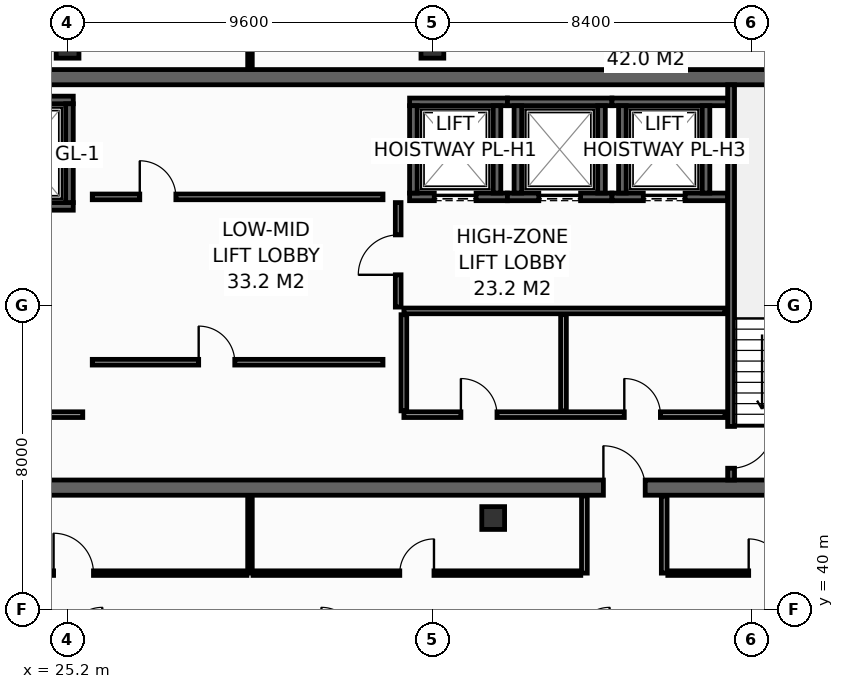
"""IFC4 building model, lengths in metres.
Left out: names, types, materials, properties, quantities, classifications, styles, units other than length and angle.
Written with IfcOpenShell. Run it as: python <this file> out.ifc"""

import sys

from ifc_helpers import new_model, si_unit, direction, frame, frame_2d, origin, origin_2d, place, context, subcontext, project, spatial, rectangle, hollow_rectangle, extrude, element, fill, save


model = new_model("IFC4")
c1 = context("Model", 3, precision=1e-05, world=origin(), true_north=direction((0.0, 1.0)))
c2 = subcontext(c1, "Body", "Model", "MODEL_VIEW")
j1 = project(units=[si_unit("LENGTHUNIT", "METRE"), si_unit("PLANEANGLEUNIT", "RADIAN")], contexts=[c1])
p1 = place(None, origin())
s1 = spatial("IfcSite", under=j1, at=p1, CompositionType="ELEMENT")
p2 = place(p1, origin())
s2 = spatial("IfcBuilding", under=s1, at=p2, CompositionType="ELEMENT")
p3 = place(p2, frame((0.0, 0.0, 280.0)))
s3 = spatial("IfcBuildingStorey", under=s2, at=p3, CompositionType="ELEMENT", Elevation=280.0)
p4 = place(p3, frame((13.7, 43.2, 0.0), z_axis=(0.0, 0.0, 1.0), x_axis=(1.0, 0.0, 0.0)))
e1 = element("IfcWall", 1, at=p4, inside=s3, PredefinedType="SHEAR", context=c2, shape_type="SweptSolid", body=[
    extrude(rectangle(XDim=32.5, YDim=0.4, at=frame_2d((16.25, 0.0))), origin(), (0.0, 0.0, 1.0), 3.55),
])
p5 = place(p4, frame((5.4, 0.0, 0.0)))
e2 = element("IfcOpeningElement", 2, at=p5, cuts=e1, PredefinedType="OPENING", context=c2, shape_type="SweptSolid", body=[
    extrude(rectangle(XDim=1.1, YDim=2.15, at=frame_2d((0.55, 1.075))), frame((0.0, 0.21, 0.0), z_axis=(0.0, -1.0, 0.0), x_axis=(1.0, 0.0, 0.0)), (0.0, 0.0, 1.0), 0.42),
])
p6 = place(p4, frame((25.6, 0.0, 0.0)))
e3 = element("IfcOpeningElement", 3, at=p6, cuts=e1, PredefinedType="OPENING", context=c2, shape_type="SweptSolid", body=[
    extrude(rectangle(XDim=1.1, YDim=2.15, at=frame_2d((0.55, 1.075))), frame((0.0, 0.21, 0.0), z_axis=(0.0, -1.0, 0.0), x_axis=(1.0, 0.0, 0.0)), (0.0, 0.0, 1.0), 0.42),
])
p7 = place(p3, frame((13.7, 54.0, 0.0), z_axis=(0.0, 0.0, 1.0), x_axis=(1.0, 0.0, 0.0)))
e4 = element("IfcWall", 4, at=p7, inside=s3, PredefinedType="SHEAR", context=c2, shape_type="SweptSolid", body=[
    extrude(rectangle(XDim=32.5, YDim=0.4, at=frame_2d((16.25, 0.0))), origin(), (0.0, 0.0, 1.0), 3.55),
])
for number, where, z_axis, x_axis in (
    (5, (25.2, 54.8, 0.0), (0.0, 0.0, 1.0), (1.0, 0.0, 0.0)),
    (6, (34.8, 54.8, 0.0), (0.0, 0.0, 1.0), (1.0, 0.0, 0.0)),
    (7, (36.4, 42.4, 0.0), (0.0, 0.0, 1.0), (1.0, 0.0, 0.0)),
):
    element("IfcColumn", number, at=place(p3, frame(where, z_axis=z_axis, x_axis=x_axis)), inside=s3, PredefinedType="COLUMN", context=c2, shape_type="SweptSolid", body=[
        extrude(hollow_rectangle(XDim=0.6, YDim=0.6, WallThickness=0.028, at=origin_2d()), origin(), (0.0, 0.0, 1.0), 3.8),
    ])
p8 = place(p3, frame((22.5, 50.6, 0.0), z_axis=(0.0, 0.0, 1.0), x_axis=(1.0, 0.0, 0.0)))
e8 = element("IfcWall", 8, at=p8, inside=s3, PredefinedType="SHEAR", context=c2, shape_type="SweptSolid", body=[
    extrude(rectangle(XDim=2.85, YDim=0.2, at=frame_2d((1.425, 0.0))), origin(), (0.0, 0.0, 1.0), 3.55),
])
p9 = place(p8, frame((0.925, 0.0, 0.0)))
e9 = element("IfcOpeningElement", 9, at=p9, cuts=e8, PredefinedType="OPENING", context=c2, shape_type="SweptSolid", body=[
    extrude(rectangle(XDim=1.25, YDim=2.3, at=frame_2d((0.625, 1.15))), frame((0.0, 0.11, 0.0), z_axis=(0.0, -1.0, 0.0), x_axis=(1.0, 0.0, 0.0)), (0.0, 0.0, 1.0), 0.22),
])
p10 = place(p3, frame((22.5, 53.4, 0.0), z_axis=(0.0, 0.0, 1.0), x_axis=(1.0, 0.0, 0.0)))
e10 = element("IfcWall", 10, at=p10, inside=s3, PredefinedType="SHEAR", context=c2, shape_type="SweptSolid", body=[
    extrude(rectangle(XDim=2.85, YDim=0.2, at=frame_2d((1.425, 0.0))), origin(), (0.0, 0.0, 1.0), 3.55),
])
p11 = place(p3, frame((25.25, 50.7, 0.0), z_axis=(0.0, 0.0, 1.0), x_axis=(0.0, 1.0, 0.0)))
e11 = element("IfcWall", 11, at=p11, inside=s3, PredefinedType="SHEAR", context=c2, shape_type="SweptSolid", body=[
    extrude(rectangle(XDim=2.6, YDim=0.2, at=frame_2d((1.3, 0.0))), origin(), (0.0, 0.0, 1.0), 3.55),
])
p12 = place(p3, frame((34.2, 50.85, 0.0), z_axis=(0.0, 0.0, 1.0), x_axis=(1.0, 0.0, 0.0)))
e12 = element("IfcWall", 12, at=p12, inside=s3, PredefinedType="SHEAR", context=c2, shape_type="SweptSolid", body=[
    extrude(rectangle(XDim=2.575, YDim=0.2, at=frame_2d((1.288, 0.0))), origin(), (0.0, 0.0, 1.0), 3.55),
])
p13 = place(p12, frame((0.65, 0.0, 0.0)))
e13 = element("IfcOpeningElement", 13, at=p13, cuts=e12, PredefinedType="OPENING", context=c2, shape_type="SweptSolid", body=[
    extrude(rectangle(XDim=1.1, YDim=2.2, at=frame_2d((0.55, 1.1))), frame((0.0, 0.11, 0.0), z_axis=(0.0, -1.0, 0.0), x_axis=(1.0, 0.0, 0.0)), (0.0, 0.0, 1.0), 0.22),
])
p14 = place(p3, frame((34.2, 53.35, 0.0), z_axis=(0.0, 0.0, 1.0), x_axis=(1.0, 0.0, 0.0)))
e14 = element("IfcWall", 14, at=p14, inside=s3, PredefinedType="SHEAR", context=c2, shape_type="SweptSolid", body=[
    extrude(rectangle(XDim=2.575, YDim=0.2, at=frame_2d((1.288, 0.0))), origin(), (0.0, 0.0, 1.0), 3.55),
])
for number, where, z_axis, x_axis in (
    (15, (34.3, 50.95, 0.0), (0.0, 0.0, 1.0), (0.0, 1.0, 0.0)),
    (16, (36.5, 50.95, 0.0), (0.0, 0.0, 1.0), (0.0, 1.0, 0.0)),
):
    element("IfcWall", number, at=place(p3, frame(where, z_axis=z_axis, x_axis=x_axis)), inside=s3, PredefinedType="SHEAR", context=c2, shape_type="SweptSolid", body=[
        extrude(rectangle(XDim=2.3, YDim=0.2, at=frame_2d((1.15, 0.0))), origin(), (0.0, 0.0, 1.0), 3.55),
    ])
p15 = place(p3, frame((36.775, 50.85, 0.0), z_axis=(0.0, 0.0, 1.0), x_axis=(1.0, 0.0, 0.0)))
e17 = element("IfcWall", 17, at=p15, inside=s3, PredefinedType="SHEAR", context=c2, shape_type="SweptSolid", body=[
    extrude(rectangle(XDim=2.75, YDim=0.2, at=frame_2d((1.375, 0.0))), origin(), (0.0, 0.0, 1.0), 3.55),
])
p16 = place(p15, frame((0.825, 0.0, 0.0)))
e18 = element("IfcOpeningElement", 18, at=p16, cuts=e17, PredefinedType="OPENING", context=c2, shape_type="SweptSolid", body=[
    extrude(rectangle(XDim=1.1, YDim=2.2, at=frame_2d((0.55, 1.1))), frame((0.0, 0.11, 0.0), z_axis=(0.0, -1.0, 0.0), x_axis=(1.0, 0.0, 0.0)), (0.0, 0.0, 1.0), 0.22),
])
p17 = place(p3, frame((36.775, 53.35, 0.0), z_axis=(0.0, 0.0, 1.0), x_axis=(1.0, 0.0, 0.0)))
e19 = element("IfcWall", 19, at=p17, inside=s3, PredefinedType="SHEAR", context=c2, shape_type="SweptSolid", body=[
    extrude(rectangle(XDim=2.75, YDim=0.2, at=frame_2d((1.375, 0.0))), origin(), (0.0, 0.0, 1.0), 3.55),
])
for number, where, z_axis, x_axis in (
    (20, (37.05, 50.95, 0.0), (0.0, 0.0, 1.0), (0.0, 1.0, 0.0)),
    (21, (39.25, 50.95, 0.0), (0.0, 0.0, 1.0), (0.0, 1.0, 0.0)),
):
    element("IfcWall", number, at=place(p3, frame(where, z_axis=z_axis, x_axis=x_axis)), inside=s3, PredefinedType="SHEAR", context=c2, shape_type="SweptSolid", body=[
        extrude(rectangle(XDim=2.3, YDim=0.2, at=frame_2d((1.15, 0.0))), origin(), (0.0, 0.0, 1.0), 3.55),
    ])
p18 = place(p3, frame((39.525, 50.85, 0.0), z_axis=(0.0, 0.0, 1.0), x_axis=(1.0, 0.0, 0.0)))
e22 = element("IfcWall", 22, at=p18, inside=s3, PredefinedType="SHEAR", context=c2, shape_type="SweptSolid", body=[
    extrude(rectangle(XDim=3.045, YDim=0.2, at=frame_2d((1.522, 0.0))), origin(), (0.0, 0.0, 1.0), 3.55),
])
p19 = place(p18, frame((0.825, 0.0, 0.0)))
e23 = element("IfcOpeningElement", 23, at=p19, cuts=e22, PredefinedType="OPENING", context=c2, shape_type="SweptSolid", body=[
    extrude(rectangle(XDim=1.1, YDim=2.2, at=frame_2d((0.55, 1.1))), frame((0.0, 0.11, 0.0), z_axis=(0.0, -1.0, 0.0), x_axis=(1.0, 0.0, 0.0)), (0.0, 0.0, 1.0), 0.22),
])
p20 = place(p3, frame((39.525, 53.35, 0.0), z_axis=(0.0, 0.0, 1.0), x_axis=(1.0, 0.0, 0.0)))
e24 = element("IfcWall", 24, at=p20, inside=s3, PredefinedType="SHEAR", context=c2, shape_type="SweptSolid", body=[
    extrude(rectangle(XDim=3.045, YDim=0.2, at=frame_2d((1.522, 0.0))), origin(), (0.0, 0.0, 1.0), 3.55),
])
for number, where, z_axis, x_axis in (
    (25, (39.8, 50.95, 0.0), (0.0, 0.0, 1.0), (0.0, 1.0, 0.0)),
    (26, (42.0, 50.95, 0.0), (0.0, 0.0, 1.0), (0.0, 1.0, 0.0)),
):
    element("IfcWall", number, at=place(p3, frame(where, z_axis=z_axis, x_axis=x_axis)), inside=s3, PredefinedType="SHEAR", context=c2, shape_type="SweptSolid", body=[
        extrude(rectangle(XDim=2.3, YDim=0.2, at=frame_2d((1.15, 0.0))), origin(), (0.0, 0.0, 1.0), 3.55),
    ])
p21 = place(p3, frame((42.66, 53.8, 0.0), z_axis=(0.0, 0.0, 1.0), x_axis=(0.0, -1.0, 0.0)))
e27 = element("IfcWall", 27, at=p21, inside=s3, PredefinedType="SHEAR", context=c2, shape_type="SweptSolid", body=[
    extrude(rectangle(XDim=10.4, YDim=0.18, at=frame_2d((5.2, 0.0))), origin(), (0.0, 0.0, 1.0), 3.55),
])
p22 = place(p21, frame((8.99, 0.0, 0.0)))
e28 = element("IfcOpeningElement", 28, at=p22, cuts=e27, PredefinedType="OPENING", context=c2, shape_type="SweptSolid", body=[
    extrude(rectangle(XDim=1.1, YDim=2.15, at=frame_2d((0.55, 1.075))), frame((0.0, 0.1, 0.0), z_axis=(0.0, -1.0, 0.0), x_axis=(1.0, 0.0, 0.0)), (0.0, 0.0, 1.0), 0.2),
])
p23 = place(p3, frame((22.68, 45.12, 0.0), z_axis=(0.0, 0.0, 1.0), x_axis=(1.0, 0.0, 0.0)))
e29 = element("IfcWall", 29, at=p23, inside=s3, PredefinedType="PARTITIONING", context=c2, shape_type="SweptSolid", body=[
    extrude(rectangle(XDim=2.92, YDim=0.15, at=frame_2d((1.46, 0.0))), origin(), (0.0, 0.0, 1.0), 3.55),
])
p24 = place(p23, frame((0.85, 0.0, 0.0)))
e30 = element("IfcOpeningElement", 30, at=p24, cuts=e29, PredefinedType="OPENING", context=c2, shape_type="SweptSolid", body=[
    extrude(rectangle(XDim=1.1, YDim=2.15, at=frame_2d((0.55, 1.075))), frame((0.0, 0.085, 0.0), z_axis=(0.0, -1.0, 0.0), x_axis=(1.0, 0.0, 0.0)), (0.0, 0.0, 1.0), 0.17),
])
p25 = place(p3, frame((33.9, 47.95, 0.0), z_axis=(0.0, 0.0, 1.0), x_axis=(0.0, 1.0, 0.0)))
e31 = element("IfcWall", 31, at=p25, inside=s3, PredefinedType="PARTITIONING", context=c2, shape_type="SweptSolid", body=[
    extrude(rectangle(XDim=2.75, YDim=0.15, at=frame_2d((1.375, 0.0))), origin(), (0.0, 0.0, 1.0), 3.55),
])
p26 = place(p25, frame((0.85, 0.0, 0.0)))
e32 = element("IfcOpeningElement", 32, at=p26, cuts=e31, PredefinedType="OPENING", context=c2, shape_type="SweptSolid", body=[
    extrude(rectangle(XDim=1.05, YDim=2.15, at=frame_2d((0.525, 1.075))), frame((0.0, 0.085, 0.0), z_axis=(0.0, -1.0, 0.0), x_axis=(1.0, 0.0, 0.0)), (0.0, 0.0, 1.0), 0.17),
])
p27 = place(p3, frame((34.05, 45.12, 0.0), z_axis=(0.0, 0.0, 1.0), x_axis=(1.0, 0.0, 0.0)))
e33 = element("IfcWall", 33, at=p27, inside=s3, PredefinedType="PARTITIONING", context=c2, shape_type="SweptSolid", body=[
    extrude(rectangle(XDim=8.45, YDim=0.15, at=frame_2d((4.225, 0.0))), origin(), (0.0, 0.0, 1.0), 3.55),
])
p28 = place(p27, frame((1.5, 0.0, 0.0)))
e34 = element("IfcOpeningElement", 34, at=p28, cuts=e33, PredefinedType="OPENING", context=c2, shape_type="SweptSolid", body=[
    extrude(rectangle(XDim=0.95, YDim=2.15, at=frame_2d((0.475, 1.075))), frame((0.0, 0.085, 0.0), z_axis=(0.0, -1.0, 0.0), x_axis=(1.0, 0.0, 0.0)), (0.0, 0.0, 1.0), 0.17),
])
p29 = place(p27, frame((5.8, 0.0, 0.0)))
e35 = element("IfcOpeningElement", 35, at=p29, cuts=e33, PredefinedType="OPENING", context=c2, shape_type="SweptSolid", body=[
    extrude(rectangle(XDim=0.95, YDim=2.15, at=frame_2d((0.475, 1.075))), frame((0.0, 0.085, 0.0), z_axis=(0.0, -1.0, 0.0), x_axis=(1.0, 0.0, 0.0)), (0.0, 0.0, 1.0), 0.17),
])
p30 = place(p3, frame((34.05, 47.85, 0.0), z_axis=(0.0, 0.0, 1.0), x_axis=(1.0, 0.0, 0.0)))
e36 = element("IfcWall", 36, at=p30, inside=s3, PredefinedType="PARTITIONING", context=c2, shape_type="SweptSolid", body=[
    extrude(rectangle(XDim=8.45, YDim=0.15, at=frame_2d((4.225, 0.0))), origin(), (0.0, 0.0, 1.0), 3.55),
])
for number, where, z_axis, x_axis in (
    (37, (38.25, 45.22, 0.0), (0.0, 0.0, 1.0), (0.0, 1.0, 0.0)),
    (38, (34.05, 45.22, 0.0), (0.0, 0.0, 1.0), (0.0, 1.0, 0.0)),
):
    element("IfcWall", number, at=place(p3, frame(where, z_axis=z_axis, x_axis=x_axis)), inside=s3, PredefinedType="PARTITIONING", context=c2, shape_type="SweptSolid", body=[
        extrude(rectangle(XDim=2.53, YDim=0.15, at=frame_2d((1.265, 0.0))), origin(), (0.0, 0.0, 1.0), 3.55),
    ])
p31 = place(p3, frame((25.85, 50.85, 0.0), z_axis=(0.0, 0.0, 1.0), x_axis=(1.0, 0.0, 0.0)))
e39 = element("IfcWall", 39, at=p31, inside=s3, PredefinedType="PARTITIONING", context=c2, shape_type="SweptSolid", body=[
    extrude(rectangle(XDim=7.65, YDim=0.15, at=frame_2d((3.825, 0.0))), origin(), (0.0, 0.0, 1.0), 3.55),
])
p32 = place(p31, frame((1.25, 0.0, 0.0)))
e40 = element("IfcOpeningElement", 40, at=p32, cuts=e39, PredefinedType="OPENING", context=c2, shape_type="SweptSolid", body=[
    extrude(rectangle(XDim=0.95, YDim=2.15, at=frame_2d((0.475, 1.075))), frame((0.0, 0.085, 0.0), z_axis=(0.0, -1.0, 0.0), x_axis=(1.0, 0.0, 0.0)), (0.0, 0.0, 1.0), 0.17),
])
p33 = place(p3, frame((25.85, 46.5, 0.0), z_axis=(0.0, 0.0, 1.0), x_axis=(1.0, 0.0, 0.0)))
e41 = element("IfcWall", 41, at=p33, inside=s3, PredefinedType="PARTITIONING", context=c2, shape_type="SweptSolid", body=[
    extrude(rectangle(XDim=7.65, YDim=0.15, at=frame_2d((3.825, 0.0))), origin(), (0.0, 0.0, 1.0), 3.55),
])
p34 = place(p33, frame((2.8, 0.0, 0.0)))
e42 = element("IfcOpeningElement", 42, at=p34, cuts=e41, PredefinedType="OPENING", context=c2, shape_type="SweptSolid", body=[
    extrude(rectangle(XDim=0.95, YDim=2.15, at=frame_2d((0.475, 1.075))), frame((0.0, 0.085, 0.0), z_axis=(0.0, -1.0, 0.0), x_axis=(1.0, 0.0, 0.0)), (0.0, 0.0, 1.0), 0.17),
])
p35 = place(p3, frame((30.0, 54.22, 0.0), z_axis=(0.0, 0.0, 1.0), x_axis=(0.0, 1.0, 0.0)))
e43 = element("IfcWall", 43, at=p35, inside=s3, PredefinedType="PARTITIONING", context=c2, shape_type="SweptSolid", body=[
    extrude(rectangle(XDim=1.775, YDim=0.12, at=frame_2d((0.888, 0.0))), origin(), (0.0, 0.0, 1.0), 2.935),
])
for number, where, z_axis, x_axis in (
    (44, (38.8, 40.95, 0.0), (0.0, 0.0, 1.0), (0.0, 1.0, 0.0)),
    (45, (40.9, 40.95, 0.0), (0.0, 0.0, 1.0), (0.0, 1.0, 0.0)),
):
    element("IfcWall", number, at=place(p3, frame(where, z_axis=z_axis, x_axis=x_axis)), inside=s3, PredefinedType="PARTITIONING", context=c2, shape_type="SweptSolid", body=[
        extrude(rectangle(XDim=2.03, YDim=0.15, at=frame_2d((1.015, 0.0))), origin(), (0.0, 0.0, 1.0), 3.55),
    ])
p36 = place(p3, frame((30.0, 40.95, 0.0), z_axis=(0.0, 0.0, 1.0), x_axis=(0.0, 1.0, 0.0)))
e46 = element("IfcWall", 46, at=p36, inside=s3, PredefinedType="PARTITIONING", context=c2, shape_type="SweptSolid", body=[
    extrude(rectangle(XDim=2.03, YDim=0.12, at=frame_2d((1.015, 0.0))), origin(), (0.0, 0.0, 1.0), 2.947),
])
p37 = place(p3, frame((20.795, 40.95, 0.0), z_axis=(0.0, 0.0, 1.0), x_axis=(1.0, 0.0, 0.0)))
e47 = element("IfcWall", 47, at=p37, inside=s3, PredefinedType="PARTITIONING", context=c2, shape_type="SweptSolid", body=[
    extrude(rectangle(XDim=9.125, YDim=0.12, at=frame_2d((4.562, 0.0))), origin(), (0.0, 0.0, 1.0), 3.047),
])
p38 = place(p37, frame((4.037, 0.0, 0.0)))
e48 = element("IfcOpeningElement", 48, at=p38, cuts=e47, PredefinedType="OPENING", context=c2, shape_type="SweptSolid", body=[
    extrude(rectangle(XDim=1.05, YDim=2.15, at=frame_2d((0.525, 1.075))), frame((0.0, 0.07, 0.0), z_axis=(0.0, -1.0, 0.0), x_axis=(1.0, 0.0, 0.0)), (0.0, 0.0, 1.0), 0.14),
])
p39 = place(p3, frame((30.08, 40.95, 0.0), z_axis=(0.0, 0.0, 1.0), x_axis=(1.0, 0.0, 0.0)))
e49 = element("IfcWall", 49, at=p39, inside=s3, PredefinedType="PARTITIONING", context=c2, shape_type="SweptSolid", body=[
    extrude(rectangle(XDim=8.625, YDim=0.12, at=frame_2d((4.312, 0.0))), origin(), (0.0, 0.0, 1.0), 3.047),
])
p40 = place(p39, frame((3.862, 0.0, 0.0)))
e50 = element("IfcOpeningElement", 50, at=p40, cuts=e49, PredefinedType="OPENING", context=c2, shape_type="SweptSolid", body=[
    extrude(rectangle(XDim=0.9, YDim=2.1, at=frame_2d((0.45, 1.05))), frame((0.0, 0.07, 0.0), z_axis=(0.0, -1.0, 0.0), x_axis=(1.0, 0.0, 0.0)), (0.0, 0.0, 1.0), 0.14),
])
p41 = place(p3, frame((40.995, 40.95, 0.0), z_axis=(0.0, 0.0, 1.0), x_axis=(1.0, 0.0, 0.0)))
e51 = element("IfcWall", 51, at=p41, inside=s3, PredefinedType="PARTITIONING", context=c2, shape_type="SweptSolid", body=[
    extrude(rectangle(XDim=5.155, YDim=0.12, at=frame_2d((2.577, 0.0))), origin(), (0.0, 0.0, 1.0), 3.55),
])
p42 = place(p41, frame((2.128, 0.0, 0.0)))
e52 = element("IfcOpeningElement", 52, at=p42, cuts=e51, PredefinedType="OPENING", context=c2, shape_type="SweptSolid", body=[
    extrude(rectangle(XDim=0.9, YDim=2.1, at=frame_2d((0.45, 1.05))), frame((0.0, 0.07, 0.0), z_axis=(0.0, -1.0, 0.0), x_axis=(1.0, 0.0, 0.0)), (0.0, 0.0, 1.0), 0.14),
])
p43 = place(p13, origin())
e53 = element("IfcDoor", 53, at=p43, inside=s3, OperationType="SLIDING_TO_LEFT", PredefinedType="DOOR", context=c2, shape_type="SweptSolid", body=[
    extrude(rectangle(XDim=1.1, YDim=2.2, at=frame_2d((0.55, 1.1))), frame((0.0, 0.025, 0.0), z_axis=(0.0, -1.0, 0.0), x_axis=(1.0, 0.0, 0.0)), (0.0, 0.0, 1.0), 0.05),
])
fill(e13, e53)
p44 = place(p16, origin())
e54 = element("IfcDoor", 54, at=p44, inside=s3, OperationType="SLIDING_TO_LEFT", PredefinedType="DOOR", context=c2, shape_type="SweptSolid", body=[
    extrude(rectangle(XDim=1.1, YDim=2.2, at=frame_2d((0.55, 1.1))), frame((0.0, 0.025, 0.0), z_axis=(0.0, -1.0, 0.0), x_axis=(1.0, 0.0, 0.0)), (0.0, 0.0, 1.0), 0.05),
])
fill(e18, e54)
p45 = place(p19, origin())
e55 = element("IfcDoor", 55, at=p45, inside=s3, OperationType="SLIDING_TO_LEFT", PredefinedType="DOOR", context=c2, shape_type="SweptSolid", body=[
    extrude(rectangle(XDim=1.1, YDim=2.2, at=frame_2d((0.55, 1.1))), frame((0.0, 0.025, 0.0), z_axis=(0.0, -1.0, 0.0), x_axis=(1.0, 0.0, 0.0)), (0.0, 0.0, 1.0), 0.05),
])
fill(e23, e55)
p46 = place(p22, origin())
e56 = element("IfcDoor", 56, at=p46, inside=s3, OperationType="SINGLE_SWING_LEFT", PredefinedType="DOOR", context=c2, shape_type="SweptSolid", body=[
    extrude(rectangle(XDim=1.1, YDim=2.15, at=frame_2d((0.55, 1.075))), frame((0.0, 0.025, 0.0), z_axis=(0.0, -1.0, 0.0), x_axis=(1.0, 0.0, 0.0)), (0.0, 0.0, 1.0), 0.05),
])
fill(e28, e56)
p47 = place(p6, origin())
e57 = element("IfcDoor", 57, at=p47, inside=s3, OperationType="SINGLE_SWING_LEFT", PredefinedType="DOOR", context=c2, shape_type="SweptSolid", body=[
    extrude(rectangle(XDim=1.1, YDim=2.15, at=frame_2d((0.55, 1.075))), frame((0.0, 0.025, 0.0), z_axis=(0.0, -1.0, 0.0), x_axis=(1.0, 0.0, 0.0)), (0.0, 0.0, 1.0), 0.05),
])
fill(e3, e57)
p48 = place(p26, origin())
e58 = element("IfcDoor", 58, at=p48, inside=s3, OperationType="SINGLE_SWING_LEFT", PredefinedType="DOOR", context=c2, shape_type="SweptSolid", body=[
    extrude(rectangle(XDim=1.05, YDim=2.15, at=frame_2d((0.525, 1.075))), frame((0.0, 0.025, 0.0), z_axis=(0.0, -1.0, 0.0), x_axis=(1.0, 0.0, 0.0)), (0.0, 0.0, 1.0), 0.05),
])
fill(e32, e58)
p49 = place(p28, origin())
e59 = element("IfcDoor", 59, at=p49, inside=s3, OperationType="SINGLE_SWING_LEFT", PredefinedType="DOOR", context=c2, shape_type="SweptSolid", body=[
    extrude(rectangle(XDim=0.95, YDim=2.15, at=frame_2d((0.475, 1.075))), frame((0.0, 0.025, 0.0), z_axis=(0.0, -1.0, 0.0), x_axis=(1.0, 0.0, 0.0)), (0.0, 0.0, 1.0), 0.05),
])
fill(e34, e59)
p50 = place(p29, origin())
e60 = element("IfcDoor", 60, at=p50, inside=s3, OperationType="SINGLE_SWING_LEFT", PredefinedType="DOOR", context=c2, shape_type="SweptSolid", body=[
    extrude(rectangle(XDim=0.95, YDim=2.15, at=frame_2d((0.475, 1.075))), frame((0.0, 0.025, 0.0), z_axis=(0.0, -1.0, 0.0), x_axis=(1.0, 0.0, 0.0)), (0.0, 0.0, 1.0), 0.05),
])
fill(e35, e60)
p51 = place(p32, origin())
e61 = element("IfcDoor", 61, at=p51, inside=s3, OperationType="SINGLE_SWING_LEFT", PredefinedType="DOOR", context=c2, shape_type="SweptSolid", body=[
    extrude(rectangle(XDim=0.95, YDim=2.15, at=frame_2d((0.475, 1.075))), frame((0.0, 0.025, 0.0), z_axis=(0.0, -1.0, 0.0), x_axis=(1.0, 0.0, 0.0)), (0.0, 0.0, 1.0), 0.05),
])
fill(e40, e61)
p52 = place(p34, origin())
e62 = element("IfcDoor", 62, at=p52, inside=s3, OperationType="SINGLE_SWING_LEFT", PredefinedType="DOOR", context=c2, shape_type="SweptSolid", body=[
    extrude(rectangle(XDim=0.95, YDim=2.15, at=frame_2d((0.475, 1.075))), frame((0.0, 0.025, 0.0), z_axis=(0.0, -1.0, 0.0), x_axis=(1.0, 0.0, 0.0)), (0.0, 0.0, 1.0), 0.05),
])
fill(e42, e62)
p53 = place(p38, origin())
e63 = element("IfcDoor", 63, at=p53, inside=s3, OperationType="SINGLE_SWING_LEFT", PredefinedType="DOOR", context=c2, shape_type="SweptSolid", body=[
    extrude(rectangle(XDim=1.05, YDim=2.15, at=frame_2d((0.525, 1.075))), frame((0.0, 0.025, 0.0), z_axis=(0.0, -1.0, 0.0), x_axis=(1.0, 0.0, 0.0)), (0.0, 0.0, 1.0), 0.05),
])
fill(e48, e63)
p54 = place(p40, origin())
e64 = element("IfcDoor", 64, at=p54, inside=s3, OperationType="SINGLE_SWING_RIGHT", PredefinedType="DOOR", context=c2, shape_type="SweptSolid", body=[
    extrude(rectangle(XDim=0.9, YDim=2.1, at=frame_2d((0.45, 1.05))), frame((0.0, 0.025, 0.0), z_axis=(0.0, -1.0, 0.0), x_axis=(1.0, 0.0, 0.0)), (0.0, 0.0, 1.0), 0.05),
])
fill(e50, e64)
p55 = place(p42, origin())
e65 = element("IfcDoor", 65, at=p55, inside=s3, OperationType="SINGLE_SWING_LEFT", PredefinedType="DOOR", context=c2, shape_type="SweptSolid", body=[
    extrude(rectangle(XDim=0.9, YDim=2.1, at=frame_2d((0.45, 1.05))), frame((0.0, 0.025, 0.0), z_axis=(0.0, -1.0, 0.0), x_axis=(1.0, 0.0, 0.0)), (0.0, 0.0, 1.0), 0.05),
])
fill(e52, e65)
save(model, sys.argv[1])
